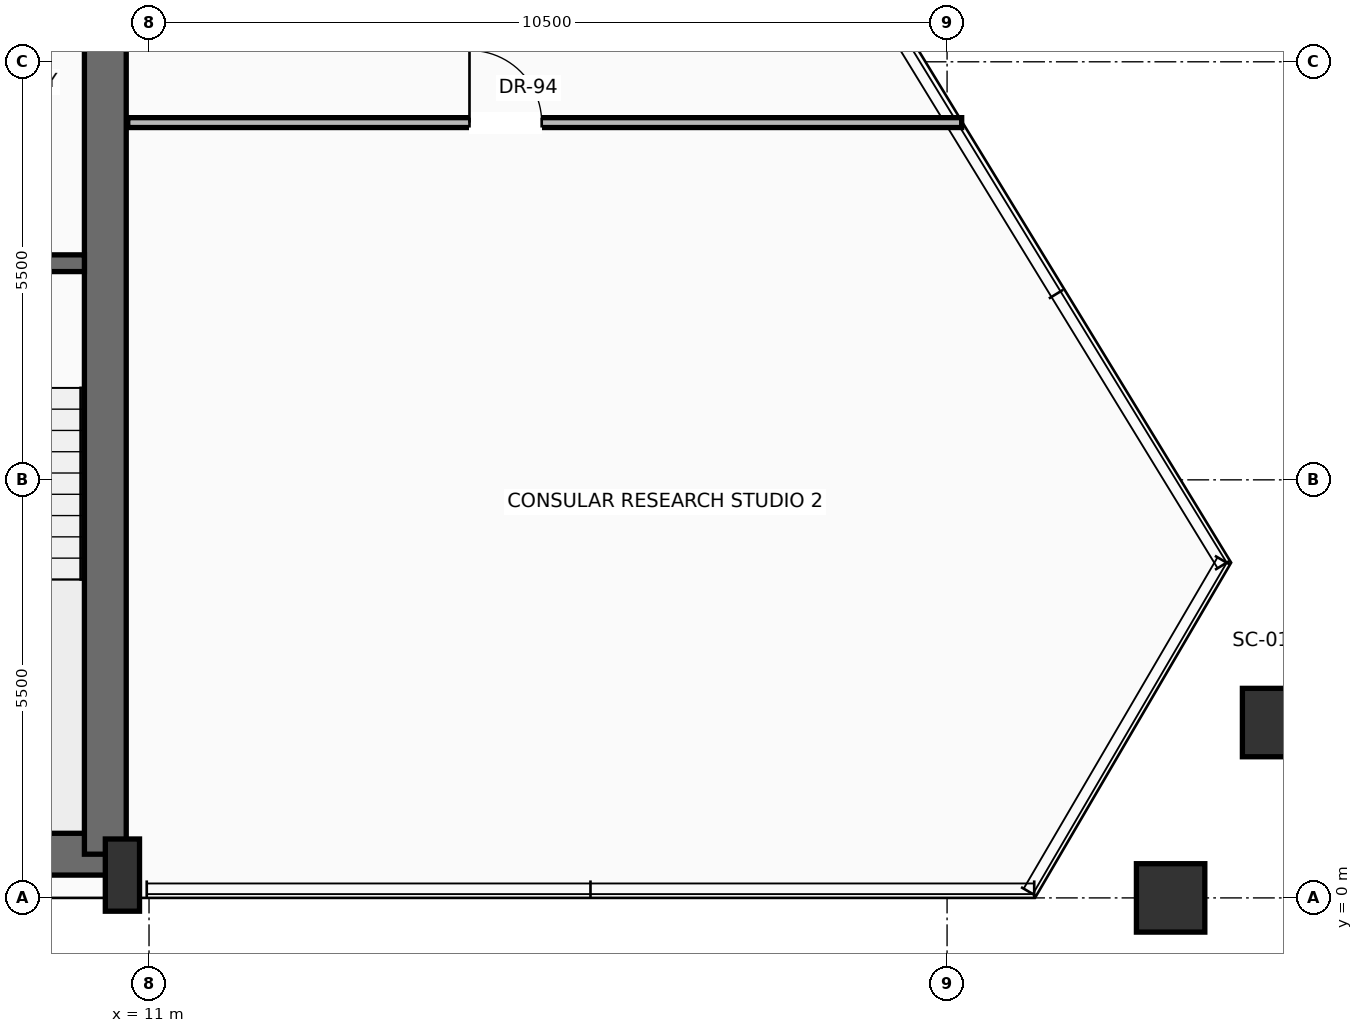
"""IFC4 building model, lengths in metres.
Left out: names, types, materials, properties, quantities, classifications, styles, units other than length and angle.
Written with IfcOpenShell. Run it as: python <this file> out.ifc"""

import sys

from ifc_helpers import new_model, si_unit, direction, frame, frame_2d, origin, origin_2d, place, context, subcontext, project, spatial, rectangle, hollow_rectangle, extrude, source, transform, mapped, element, fill, save


model = new_model("IFC4")
c1 = context("Model", 3, precision=1e-05, world=origin(), true_north=direction((0.0, 1.0)))
c2 = subcontext(c1, "Body", "Model", "MODEL_VIEW")
j1 = project(units=[si_unit("LENGTHUNIT", "METRE"), si_unit("PLANEANGLEUNIT", "RADIAN")], contexts=[c1])
p1 = place(None, origin())
s1 = spatial("IfcSite", under=j1, at=p1, CompositionType="ELEMENT")
p2 = place(p1, origin())
s2 = spatial("IfcBuilding", under=s1, at=p2, CompositionType="ELEMENT")
p3 = place(p2, frame((0.0, 0.0, 251.05)))
s3 = spatial("IfcBuildingStorey", under=s2, at=p3, CompositionType="ELEMENT", Elevation=251.05)
p4 = place(p3, frame((-10.65, 0.575, 0.0), z_axis=(0.0, 0.0, 1.0), x_axis=(1.0, 0.0, 0.0)))
e1 = element("IfcWall", 1, at=p4, inside=s3, PredefinedType="SHEAR", context=c2, shape_type="SweptSolid", body=[
    extrude(rectangle(XDim=21.3, YDim=0.55, at=frame_2d((10.65, 0.0))), origin(), (0.0, 0.0, 1.0), 3.24),
])
p5 = place(p3, frame((10.425, 0.575, 0.0), z_axis=(0.0, 0.0, 1.0), x_axis=(0.0, 1.0, 0.0)))
e2 = element("IfcWall", 2, at=p5, inside=s3, PredefinedType="SHEAR", context=c2, shape_type="SweptSolid", body=[
    extrude(rectangle(XDim=15.45, YDim=0.55, at=frame_2d((7.725, 0.0))), origin(), (0.0, 0.0, 1.0), 3.24),
])
m1 = source(origin(), c2, "Body", "SweptSolid", [
    extrude(rectangle(XDim=0.45, YDim=0.95, at=origin_2d()), origin(), (0.0, 0.0, 1.0), 3.45),
])
p6 = place(p3, frame((10.65, 0.3, 0.0), z_axis=(0.0, 0.0, 1.0), x_axis=(1.0, 0.0, 0.0)))
e3 = element("IfcColumn", 3, at=p6, inside=s3, PredefinedType="PILASTER", context=c2, shape_type="MappedRepresentation", body=[
    mapped(m1, transform((0.0, 0.0, 0.0), scale=1.0)),
])
m2 = source(origin(), c2, "Body", "SweptSolid", [
    extrude(hollow_rectangle(XDim=0.9, YDim=0.9, WallThickness=0.045, at=origin_2d()), origin(), (0.0, 0.0, 1.0), 3.441),
])
p7 = place(p3, frame((24.441, 0.0, 0.004), z_axis=(-7.0947144e-05, 0.0, 0.999999997483), x_axis=(1.0, 0.0, 0.0)))
e4 = element("IfcColumn", 4, at=p7, inside=s3, PredefinedType="COLUMN", context=c2, shape_type="MappedRepresentation", body=[
    mapped(m2, transform((0.0, 0.0, 0.0), scale=1.0)),
])
m3 = source(origin(), c2, "Body", "SweptSolid", [
    extrude(hollow_rectangle(XDim=0.9, YDim=0.9, WallThickness=0.045, at=origin_2d()), origin(), (0.0, 0.0, 1.0), 3.442),
])
p8 = place(p3, frame((25.835, 2.307, 0.004), z_axis=(-0.010640077281, -0.016172917467, 0.999812595188), x_axis=(0.835417082244, -0.549616501476, 0.0)))
e5 = element("IfcColumn", 5, at=p8, inside=s3, PredefinedType="COLUMN", context=c2, shape_type="MappedRepresentation", body=[
    mapped(m3, transform((0.0, 0.0, 0.0), scale=1.0)),
])
p9 = place(p3, frame((10.15, 8.35, 0.0), z_axis=(0.0, 0.0, 1.0), x_axis=(-1.0, 0.0, 0.0)))
e6 = element("IfcWall", 6, at=p9, inside=s3, PredefinedType="SOLIDWALL", context=c2, shape_type="SweptSolid", body=[
    extrude(rectangle(XDim=4.65, YDim=0.22, at=frame_2d((2.325, 0.0))), origin(), (0.0, 0.0, 1.0), 3.24),
])
p10 = place(p9, frame((1.0, 0.0, 0.0)))
e7 = element("IfcOpeningElement", 7, at=p10, cuts=e6, PredefinedType="OPENING", context=c2, shape_type="SweptSolid", body=[
    extrude(rectangle(XDim=1.15, YDim=2.2, at=frame_2d((0.575, 1.1))), frame((0.0, 0.12, 0.0), z_axis=(0.0, -1.0, 0.0), x_axis=(1.0, 0.0, 0.0)), (0.0, 0.0, 1.0), 0.24),
])
p11 = place(p3, frame((10.72, 10.2, 0.0), z_axis=(0.0, 0.0, 1.0), x_axis=(1.0, 0.0, 0.0)))
e8 = element("IfcWall", 8, at=p11, inside=s3, PredefinedType="PARTITIONING", context=c2, shape_type="SweptSolid", body=[
    extrude(rectangle(XDim=10.972, YDim=0.13, at=frame_2d((5.486, 0.0))), origin(), (0.0, 0.0, 1.0), 3.232),
])
p12 = place(p11, frame((4.496, 0.0, 0.0)))
e9 = element("IfcOpeningElement", 9, at=p12, cuts=e8, PredefinedType="OPENING", context=c2, shape_type="SweptSolid", body=[
    extrude(rectangle(XDim=0.95, YDim=2.2, at=frame_2d((0.475, 1.1))), frame((0.0, 0.075, 0.0), z_axis=(0.0, -1.0, 0.0), x_axis=(1.0, 0.0, 0.0)), (0.0, 0.0, 1.0), 0.15),
])
m4 = source(origin(), c2, "Body", "SweptSolid", [
    extrude(rectangle(XDim=0.95, YDim=2.2, at=frame_2d((0.475, 1.1))), frame((0.0, 0.025, 0.0), z_axis=(0.0, -1.0, 0.0), x_axis=(1.0, 0.0, 0.0)), (0.0, 0.0, 1.0), 0.05),
])
p13 = place(p12, origin())
e10 = element("IfcDoor", 10, at=p13, inside=s3, OperationType="SINGLE_SWING_LEFT", PredefinedType="DOOR", context=c2, shape_type="MappedRepresentation", body=[
    mapped(m4, transform((0.0, 0.0, 0.0), scale=1.0)),
])
fill(e9, e10)
save(model, sys.argv[1])
